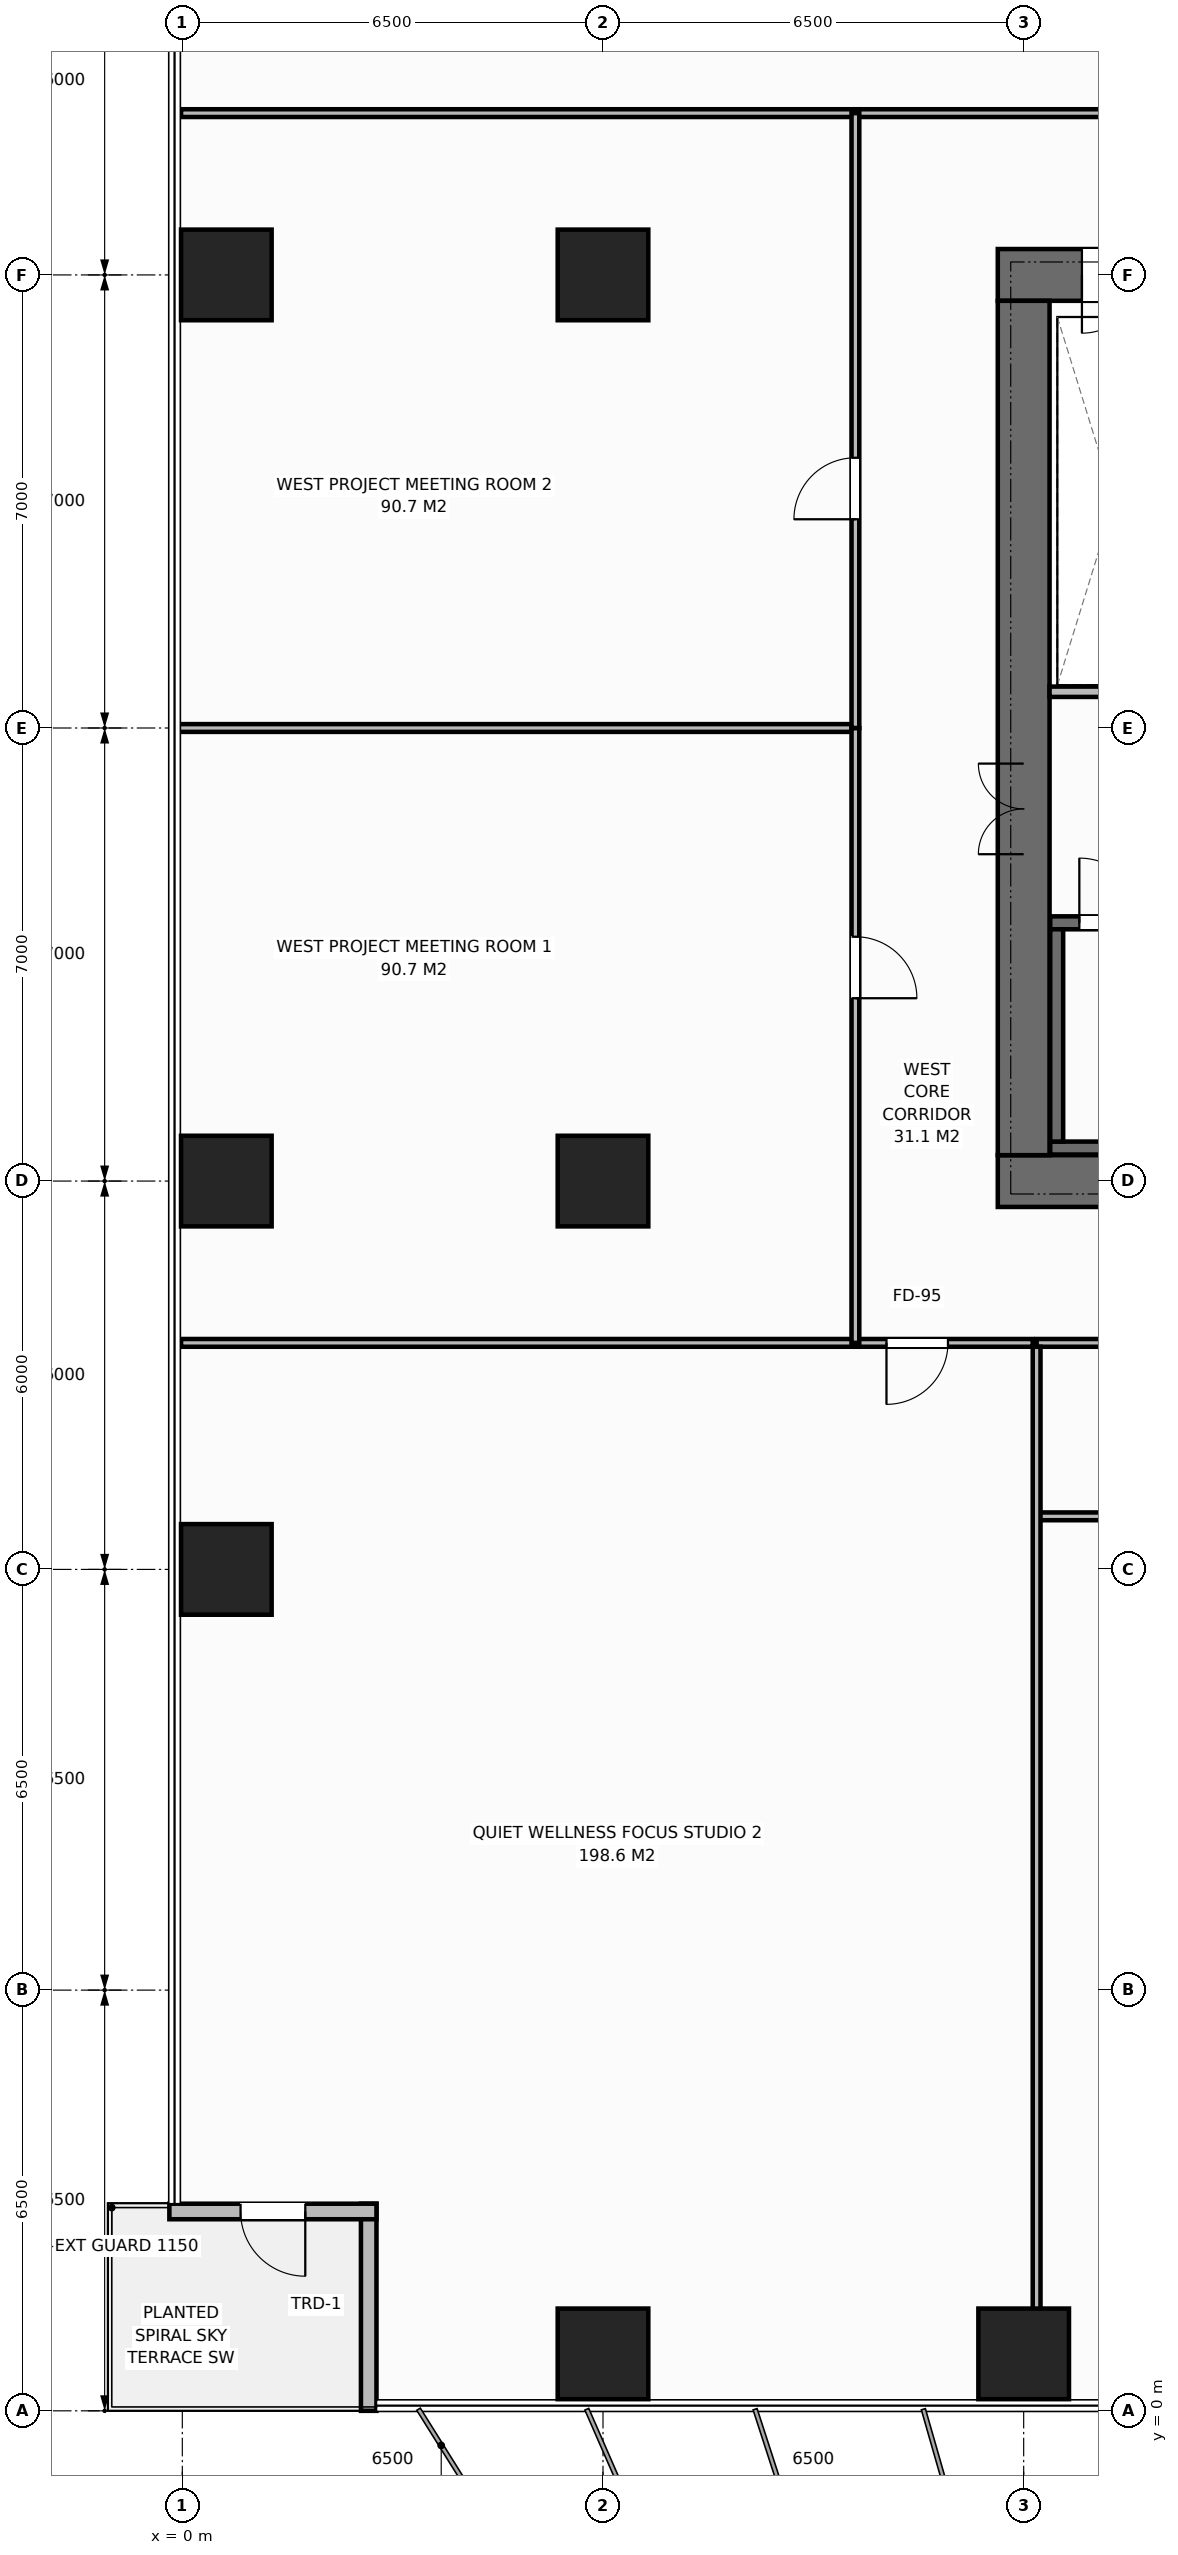
"""IFC4 building model, lengths in metres.
Left out: names, types, materials, properties, quantities, classifications, styles, units other than length and angle.
Written with IfcOpenShell. Run it as: python <this file> out.ifc"""

import sys

from ifc_helpers import new_model, si_unit, direction, frame, frame_2d, origin, origin_2d, place, context, subcontext, project, spatial, rectangle, extrude, element, fill, save


model = new_model("IFC4")
c1 = context("Model", 3, precision=1e-05, world=origin(), true_north=direction((0.0, 1.0)))
c2 = subcontext(c1, "Body", "Model", "MODEL_VIEW")
j1 = project(units=[si_unit("LENGTHUNIT", "METRE"), si_unit("PLANEANGLEUNIT", "RADIAN")], contexts=[c1])
p1 = place(None, origin())
s1 = spatial("IfcSite", under=j1, at=p1, CompositionType="ELEMENT")
p2 = place(p1, origin())
s2 = spatial("IfcBuilding", under=s1, at=p2, CompositionType="ELEMENT")
p3 = place(p2, frame((0.0, 0.0, 39.2)))
s3 = spatial("IfcBuildingStorey", under=s2, at=p3, CompositionType="ELEMENT", Elevation=39.2)
p4 = place(p3, frame((12.6, 19.0, 0.0), z_axis=(0.0, 0.0, 1.0), x_axis=(1.0, 0.0, 0.0)))
e1 = element("IfcWall", 1, at=p4, inside=s3, PredefinedType="SHEAR", context=c2, shape_type="SweptSolid", body=[
    extrude(rectangle(XDim=13.8, YDim=0.8, at=frame_2d((6.9, 0.0))), origin(), (0.0, 0.0, 1.0), 3.8),
])
p5 = place(p4, frame((9.28, 0.0, 0.0)))
e2 = element("IfcOpeningElement", 2, at=p5, cuts=e1, PredefinedType="OPENING", context=c2, shape_type="SweptSolid", body=[
    extrude(rectangle(XDim=1.4, YDim=2.2, at=frame_2d((0.7, 1.1))), frame((0.0, 0.41, 0.0), z_axis=(0.0, -1.0, 0.0), x_axis=(1.0, 0.0, 0.0)), (0.0, 0.0, 1.0), 0.82),
])
p6 = place(p3, frame((12.6, 33.0, 0.0), z_axis=(0.0, 0.0, 1.0), x_axis=(1.0, 0.0, 0.0)))
e3 = element("IfcWall", 3, at=p6, inside=s3, PredefinedType="SHEAR", context=c2, shape_type="SweptSolid", body=[
    extrude(rectangle(XDim=13.8, YDim=0.8, at=frame_2d((6.9, 0.0))), origin(), (0.0, 0.0, 1.0), 3.8),
])
p7 = place(p6, frame((1.3, 0.0, 0.0)))
e4 = element("IfcOpeningElement", 4, at=p7, cuts=e3, PredefinedType="OPENING", context=c2, shape_type="SweptSolid", body=[
    extrude(rectangle(XDim=0.9, YDim=2.15, at=frame_2d((0.45, 1.075))), frame((0.0, 0.41, 0.0), z_axis=(0.0, -1.0, 0.0), x_axis=(1.0, 0.0, 0.0)), (0.0, 0.0, 1.0), 0.82),
])
p8 = place(p6, frame((3.2, 0.0, 0.0)))
e5 = element("IfcOpeningElement", 5, at=p8, cuts=e3, PredefinedType="OPENING", context=c2, shape_type="SweptSolid", body=[
    extrude(rectangle(XDim=0.9, YDim=2.15, at=frame_2d((0.45, 1.075))), frame((0.0, 0.41, 0.0), z_axis=(0.0, -1.0, 0.0), x_axis=(1.0, 0.0, 0.0)), (0.0, 0.0, 1.0), 0.82),
])
p9 = place(p6, frame((5.0, 0.0, 0.0)))
e6 = element("IfcOpeningElement", 6, at=p9, cuts=e3, PredefinedType="OPENING", context=c2, shape_type="SweptSolid", body=[
    extrude(rectangle(XDim=0.9, YDim=2.15, at=frame_2d((0.45, 1.075))), frame((0.0, 0.41, 0.0), z_axis=(0.0, -1.0, 0.0), x_axis=(1.0, 0.0, 0.0)), (0.0, 0.0, 1.0), 0.82),
])
p10 = place(p6, frame((6.9, 0.0, 0.0)))
e7 = element("IfcOpeningElement", 7, at=p10, cuts=e3, PredefinedType="OPENING", context=c2, shape_type="SweptSolid", body=[
    extrude(rectangle(XDim=0.9, YDim=2.15, at=frame_2d((0.45, 1.075))), frame((0.0, 0.41, 0.0), z_axis=(0.0, -1.0, 0.0), x_axis=(1.0, 0.0, 0.0)), (0.0, 0.0, 1.0), 0.82),
])
p11 = place(p6, frame((9.28, 0.0, 0.0)))
e8 = element("IfcOpeningElement", 8, at=p11, cuts=e3, PredefinedType="OPENING", context=c2, shape_type="SweptSolid", body=[
    extrude(rectangle(XDim=1.4, YDim=2.2, at=frame_2d((0.7, 1.1))), frame((0.0, 0.41, 0.0), z_axis=(0.0, -1.0, 0.0), x_axis=(1.0, 0.0, 0.0)), (0.0, 0.0, 1.0), 0.82),
])
p12 = place(p3, frame((13.0, 19.4, 0.0), z_axis=(0.0, 0.0, 1.0), x_axis=(0.0, 1.0, 0.0)))
e9 = element("IfcWall", 9, at=p12, inside=s3, PredefinedType="SHEAR", context=c2, shape_type="SweptSolid", body=[
    extrude(rectangle(XDim=13.2, YDim=0.8, at=frame_2d((6.6, 0.0))), origin(), (0.0, 0.0, 1.0), 3.8),
])
p13 = place(p12, frame((4.65, 0.0, 0.0)))
e10 = element("IfcOpeningElement", 10, at=p13, cuts=e9, PredefinedType="OPENING", context=c2, shape_type="SweptSolid", body=[
    extrude(rectangle(XDim=1.4, YDim=2.2, at=frame_2d((0.7, 1.1))), frame((0.0, 0.41, 0.0), z_axis=(0.0, -1.0, 0.0), x_axis=(1.0, 0.0, 0.0)), (0.0, 0.0, 1.0), 0.82),
])
p14 = place(p3, frame((13.41, 19.51, 0.0), z_axis=(0.0, 0.0, 1.0), x_axis=(1.0, 0.0, 0.0)))
e11 = element("IfcWall", 11, at=p14, inside=s3, PredefinedType="SHEAR", context=c2, shape_type="SweptSolid", body=[
    extrude(rectangle(XDim=8.43, YDim=0.2, at=frame_2d((4.215, 0.0))), origin(), (0.0, 0.0, 1.0), 3.8),
])
p15 = place(p3, frame((13.41, 22.99, 0.0), z_axis=(0.0, 0.0, 1.0), x_axis=(1.0, 0.0, 0.0)))
e12 = element("IfcWall", 12, at=p15, inside=s3, PredefinedType="SHEAR", context=c2, shape_type="SweptSolid", body=[
    extrude(rectangle(XDim=8.43, YDim=0.2, at=frame_2d((4.215, 0.0))), origin(), (0.0, 0.0, 1.0), 3.8),
])
p16 = place(p15, frame((0.45, 0.0, 0.0)))
e13 = element("IfcOpeningElement", 13, at=p16, cuts=e12, PredefinedType="OPENING", context=c2, shape_type="SweptSolid", body=[
    extrude(rectangle(XDim=1.0, YDim=2.15, at=frame_2d((0.5, 1.075))), frame((0.0, 0.11, 0.0), z_axis=(0.0, -1.0, 0.0), x_axis=(1.0, 0.0, 0.0)), (0.0, 0.0, 1.0), 0.22),
])
p17 = place(p3, frame((13.51, 19.61, 0.0), z_axis=(0.0, 0.0, 1.0), x_axis=(0.0, 1.0, 0.0)))
e14 = element("IfcWall", 14, at=p17, inside=s3, PredefinedType="SHEAR", context=c2, shape_type="SweptSolid", body=[
    extrude(rectangle(XDim=3.28, YDim=0.2, at=frame_2d((1.64, 0.0))), origin(), (0.0, 0.0, 1.0), 3.8),
])
for number, where, z_axis, x_axis in (
    (15, (6.5, 19.0, 0.0), (0.0, 0.0, 1.0), (1.0, 0.0, 0.0)),
    (16, (6.5, 33.0, 0.0), (0.0, 0.0, 1.0), (1.0, 0.0, 0.0)),
    (17, (6.5, 0.88, 0.0), (0.0, 0.0, 1.0), (1.0, 0.0, 0.0)),
    (18, (13.0, 0.88, 0.0), (0.0, 0.0, 1.0), (1.0, 0.0, 0.0)),
    (19, (0.68, 13.0, 0.0), (0.0, 0.0, 1.0), (1.0, 0.0, 0.0)),
    (20, (0.68, 19.0, 0.0), (0.0, 0.0, 1.0), (1.0, 0.0, 0.0)),
    (21, (0.68, 33.0, 0.0), (0.0, 0.0, 1.0), (1.0, 0.0, 0.0)),
):
    element("IfcColumn", number, at=place(p3, frame(where, z_axis=z_axis, x_axis=x_axis)), inside=s3, PredefinedType="COLUMN", context=c2, shape_type="SweptSolid", body=[
        extrude(rectangle(XDim=1.4, YDim=1.4, at=origin_2d()), origin(), (0.0, 0.0, 1.0), 3.8),
    ])
p18 = place(p3, frame((2.88, 0.0, 0.0), z_axis=(0.0, 0.0, 1.0), x_axis=(0.0, 1.0, 0.0)))
e22 = element("IfcWall", 22, at=p18, inside=s3, PredefinedType="STANDARD", context=c2, shape_type="SweptSolid", body=[
    extrude(rectangle(XDim=3.2, YDim=0.24, at=frame_2d((1.6, 0.0))), origin(), (0.0, 0.0, 1.0), 3.55),
])
p19 = place(p3, frame((3.0, 3.08, 0.0), z_axis=(0.0, 0.0, 1.0), x_axis=(-1.0, 0.0, 0.0)))
e23 = element("IfcWall", 23, at=p19, inside=s3, PredefinedType="STANDARD", context=c2, shape_type="SweptSolid", body=[
    extrude(rectangle(XDim=3.2, YDim=0.24, at=frame_2d((1.6, 0.0))), origin(), (0.0, 0.0, 1.0), 3.55),
])
p20 = place(p19, frame((1.1, 0.0, 0.0)))
e24 = element("IfcOpeningElement", 24, at=p20, cuts=e23, PredefinedType="OPENING", context=c2, shape_type="SweptSolid", body=[
    extrude(rectangle(XDim=1.0, YDim=2.2, at=frame_2d((0.5, 1.1))), frame((0.0, 0.13, 0.0), z_axis=(0.0, -1.0, 0.0), x_axis=(1.0, 0.0, 0.0)), (0.0, 0.0, 1.0), 0.26),
])
p21 = place(p3, frame((13.4, 26.56, 0.0), z_axis=(0.0, 0.0, 1.0), x_axis=(1.0, 0.0, 0.0)))
e25 = element("IfcWall", 25, at=p21, inside=s3, PredefinedType="STANDARD", context=c2, shape_type="SweptSolid", body=[
    extrude(rectangle(XDim=8.34, YDim=0.16, at=frame_2d((4.17, 0.0))), origin(), (0.0, 0.0, 1.0), 3.55),
])
p22 = place(p3, frame((13.2, 16.5, 0.0), z_axis=(0.0, 0.0, 1.0), x_axis=(1.0, 0.0, 0.0)))
e26 = element("IfcWall", 26, at=p22, inside=s3, PredefinedType="PARTITIONING", context=c2, shape_type="SweptSolid", body=[
    extrude(rectangle(XDim=13.16, YDim=0.12, at=frame_2d((6.58, 0.0))), origin(), (0.0, 0.0, 1.0), 3.55),
])
p23 = place(p22, frame((1.35, 0.0, 0.0)))
e27 = element("IfcOpeningElement", 27, at=p23, cuts=e26, PredefinedType="OPENING", context=c2, shape_type="SweptSolid", body=[
    extrude(rectangle(XDim=0.9, YDim=2.15, at=frame_2d((0.45, 1.075))), frame((0.0, 0.07, 0.0), z_axis=(0.0, -1.0, 0.0), x_axis=(1.0, 0.0, 0.0)), (0.0, 0.0, 1.0), 0.14),
])
p24 = place(p22, frame((4.05, 0.0, 0.0)))
e28 = element("IfcOpeningElement", 28, at=p24, cuts=e26, PredefinedType="OPENING", context=c2, shape_type="SweptSolid", body=[
    extrude(rectangle(XDim=0.9, YDim=2.15, at=frame_2d((0.45, 1.075))), frame((0.0, 0.07, 0.0), z_axis=(0.0, -1.0, 0.0), x_axis=(1.0, 0.0, 0.0)), (0.0, 0.0, 1.0), 0.14),
])
p25 = place(p22, frame((8.25, 0.0, 0.0)))
e29 = element("IfcOpeningElement", 29, at=p25, cuts=e26, PredefinedType="OPENING", context=c2, shape_type="SweptSolid", body=[
    extrude(rectangle(XDim=0.9, YDim=2.15, at=frame_2d((0.45, 1.075))), frame((0.0, 0.07, 0.0), z_axis=(0.0, -1.0, 0.0), x_axis=(1.0, 0.0, 0.0)), (0.0, 0.0, 1.0), 0.14),
])
p26 = place(p22, frame((11.0, 0.0, 0.0)))
e30 = element("IfcOpeningElement", 30, at=p26, cuts=e26, PredefinedType="OPENING", context=c2, shape_type="SweptSolid", body=[
    extrude(rectangle(XDim=0.95, YDim=2.15, at=frame_2d((0.475, 1.075))), frame((0.0, 0.07, 0.0), z_axis=(0.0, -1.0, 0.0), x_axis=(1.0, 0.0, 0.0)), (0.0, 0.0, 1.0), 0.14),
])
p27 = place(p3, frame((13.2, 13.82, 0.0), z_axis=(0.0, 0.0, 1.0), x_axis=(1.0, 0.0, 0.0)))
e31 = element("IfcWall", 31, at=p27, inside=s3, PredefinedType="PARTITIONING", context=c2, shape_type="SweptSolid", body=[
    extrude(rectangle(XDim=13.16, YDim=0.12, at=frame_2d((6.58, 0.0))), origin(), (0.0, 0.0, 1.0), 3.55),
])
p28 = place(p3, frame((-0.02, 35.5, 0.0), z_axis=(0.0, 0.0, 1.0), x_axis=(1.0, 0.0, 0.0)))
e32 = element("IfcWall", 32, at=p28, inside=s3, PredefinedType="PARTITIONING", context=c2, shape_type="SweptSolid", body=[
    extrude(rectangle(XDim=20.386, YDim=0.12, at=frame_2d((10.193, 0.0))), origin(), (0.0, 0.0, 1.0), 3.55),
])
p29 = place(p28, frame((14.928, 0.0, 0.0)))
e33 = element("IfcOpeningElement", 33, at=p29, cuts=e32, PredefinedType="OPENING", context=c2, shape_type="SweptSolid", body=[
    extrude(rectangle(XDim=0.95, YDim=2.15, at=frame_2d((0.475, 1.075))), frame((0.0, 0.07, 0.0), z_axis=(0.0, -1.0, 0.0), x_axis=(1.0, 0.0, 0.0)), (0.0, 0.0, 1.0), 0.14),
])
p30 = place(p3, frame((13.2, 0.02, 0.0), z_axis=(0.0, 0.0, 1.0), x_axis=(0.0, 1.0, 0.0)))
e34 = element("IfcWall", 34, at=p30, inside=s3, PredefinedType="PARTITIONING", context=c2, shape_type="SweptSolid", body=[
    extrude(rectangle(XDim=16.42, YDim=0.12, at=frame_2d((8.21, 0.0))), origin(), (0.0, 0.0, 1.0), 2.9),
])
p31 = place(p3, frame((-0.02, 16.5, 0.0), z_axis=(0.0, 0.0, 1.0), x_axis=(1.0, 0.0, 0.0)))
e35 = element("IfcWall", 35, at=p31, inside=s3, PredefinedType="PARTITIONING", context=c2, shape_type="SweptSolid", body=[
    extrude(rectangle(XDim=13.16, YDim=0.12, at=frame_2d((6.58, 0.0))), origin(), (0.0, 0.0, 1.0), 3.55),
])
p32 = place(p31, frame((10.9, 0.0, 0.0)))
e36 = element("IfcOpeningElement", 36, at=p32, cuts=e35, PredefinedType="OPENING", context=c2, shape_type="SweptSolid", body=[
    extrude(rectangle(XDim=0.95, YDim=2.15, at=frame_2d((0.475, 1.075))), frame((0.0, 0.07, 0.0), z_axis=(0.0, -1.0, 0.0), x_axis=(1.0, 0.0, 0.0)), (0.0, 0.0, 1.0), 0.14),
])
p33 = place(p3, frame((-0.18, 26.0, 0.0), z_axis=(0.0, 0.0, 1.0), x_axis=(1.0, 0.0, 0.0)))
e37 = element("IfcWall", 37, at=p33, inside=s3, PredefinedType="PARTITIONING", context=c2, shape_type="SweptSolid", body=[
    extrude(rectangle(XDim=10.58, YDim=0.12, at=frame_2d((5.29, 0.0))), origin(), (0.0, 0.0, 1.0), 3.55),
])
p34 = place(p3, frame((10.4, 16.5, 0.0), z_axis=(0.0, 0.0, 1.0), x_axis=(0.0, 1.0, 0.0)))
e38 = element("IfcWall", 38, at=p34, inside=s3, PredefinedType="PARTITIONING", context=c2, shape_type="SweptSolid", body=[
    extrude(rectangle(XDim=9.5, YDim=0.12, at=frame_2d((4.75, 0.0))), origin(), (0.0, 0.0, 1.0), 3.55),
])
p35 = place(p34, frame((5.325, 0.0, 0.0)))
e39 = element("IfcOpeningElement", 39, at=p35, cuts=e38, PredefinedType="OPENING", context=c2, shape_type="SweptSolid", body=[
    extrude(rectangle(XDim=0.95, YDim=2.15, at=frame_2d((0.475, 1.075))), frame((0.0, 0.07, 0.0), z_axis=(0.0, -1.0, 0.0), x_axis=(1.0, 0.0, 0.0)), (0.0, 0.0, 1.0), 0.14),
])
p36 = place(p3, frame((10.4, 26.0, 0.0), z_axis=(0.0, 0.0, 1.0), x_axis=(0.0, 1.0, 0.0)))
e40 = element("IfcWall", 40, at=p36, inside=s3, PredefinedType="PARTITIONING", context=c2, shape_type="SweptSolid", body=[
    extrude(rectangle(XDim=9.5, YDim=0.12, at=frame_2d((4.75, 0.0))), origin(), (0.0, 0.0, 1.0), 3.55),
])
p37 = place(p36, frame((3.225, 0.0, 0.0)))
e41 = element("IfcOpeningElement", 41, at=p37, cuts=e40, PredefinedType="OPENING", context=c2, shape_type="SweptSolid", body=[
    extrude(rectangle(XDim=0.95, YDim=2.15, at=frame_2d((0.475, 1.075))), frame((0.0, 0.07, 0.0), z_axis=(0.0, -1.0, 0.0), x_axis=(1.0, 0.0, 0.0)), (0.0, 0.0, 1.0), 0.14),
])
p38 = place(p20, origin())
e42 = element("IfcDoor", 42, at=p38, inside=s3, OperationType="SINGLE_SWING_LEFT", PredefinedType="DOOR", context=c2, shape_type="SweptSolid", body=[
    extrude(rectangle(XDim=1.0, YDim=2.2, at=frame_2d((0.5, 1.1))), frame((0.0, 0.025, 0.0), z_axis=(0.0, -1.0, 0.0), x_axis=(1.0, 0.0, 0.0)), (0.0, 0.0, 1.0), 0.05),
])
fill(e24, e42)
p39 = place(p16, origin())
e43 = element("IfcDoor", 43, at=p39, inside=s3, OperationType="SINGLE_SWING_LEFT", PredefinedType="DOOR", context=c2, shape_type="SweptSolid", body=[
    extrude(rectangle(XDim=1.0, YDim=2.15, at=frame_2d((0.5, 1.075))), frame((0.0, 0.025, 0.0), z_axis=(0.0, -1.0, 0.0), x_axis=(1.0, 0.0, 0.0)), (0.0, 0.0, 1.0), 0.05),
])
fill(e13, e43)
p40 = place(p13, origin())
e44 = element("IfcDoor", 44, at=p40, inside=s3, OperationType="DOUBLE_DOOR_SINGLE_SWING", PredefinedType="DOOR", context=c2, shape_type="SweptSolid", body=[
    extrude(rectangle(XDim=1.4, YDim=2.2, at=frame_2d((0.7, 1.1))), frame((0.0, 0.025, 0.0), z_axis=(0.0, -1.0, 0.0), x_axis=(1.0, 0.0, 0.0)), (0.0, 0.0, 1.0), 0.05),
])
fill(e10, e44)
p41 = place(p7, origin())
e45 = element("IfcDoor", 45, at=p41, inside=s3, OperationType="SINGLE_SWING_RIGHT", PredefinedType="DOOR", context=c2, shape_type="SweptSolid", body=[
    extrude(rectangle(XDim=0.9, YDim=2.15, at=frame_2d((0.45, 1.075))), frame((0.0, -0.075, 0.0), z_axis=(0.0, -1.0, 0.0), x_axis=(1.0, 0.0, 0.0)), (0.0, 0.0, 1.0), 0.05),
])
fill(e4, e45)
p42 = place(p32, origin())
e46 = element("IfcDoor", 46, at=p42, inside=s3, OperationType="SINGLE_SWING_RIGHT", PredefinedType="DOOR", context=c2, shape_type="SweptSolid", body=[
    extrude(rectangle(XDim=0.95, YDim=2.15, at=frame_2d((0.475, 1.075))), frame((0.0, 0.025, 0.0), z_axis=(0.0, -1.0, 0.0), x_axis=(1.0, 0.0, 0.0)), (0.0, 0.0, 1.0), 0.05),
])
fill(e36, e46)
p43 = place(p35, origin())
e47 = element("IfcDoor", 47, at=p43, inside=s3, OperationType="SINGLE_SWING_RIGHT", PredefinedType="DOOR", context=c2, shape_type="SweptSolid", body=[
    extrude(rectangle(XDim=0.95, YDim=2.15, at=frame_2d((0.475, 1.075))), frame((0.0, 0.025, 0.0), z_axis=(0.0, -1.0, 0.0), x_axis=(1.0, 0.0, 0.0)), (0.0, 0.0, 1.0), 0.05),
])
fill(e39, e47)
p44 = place(p37, origin())
e48 = element("IfcDoor", 48, at=p44, inside=s3, OperationType="SINGLE_SWING_LEFT", PredefinedType="DOOR", context=c2, shape_type="SweptSolid", body=[
    extrude(rectangle(XDim=0.95, YDim=2.15, at=frame_2d((0.475, 1.075))), frame((0.0, 0.025, 0.0), z_axis=(0.0, -1.0, 0.0), x_axis=(1.0, 0.0, 0.0)), (0.0, 0.0, 1.0), 0.05),
])
fill(e41, e48)
save(model, sys.argv[1])
